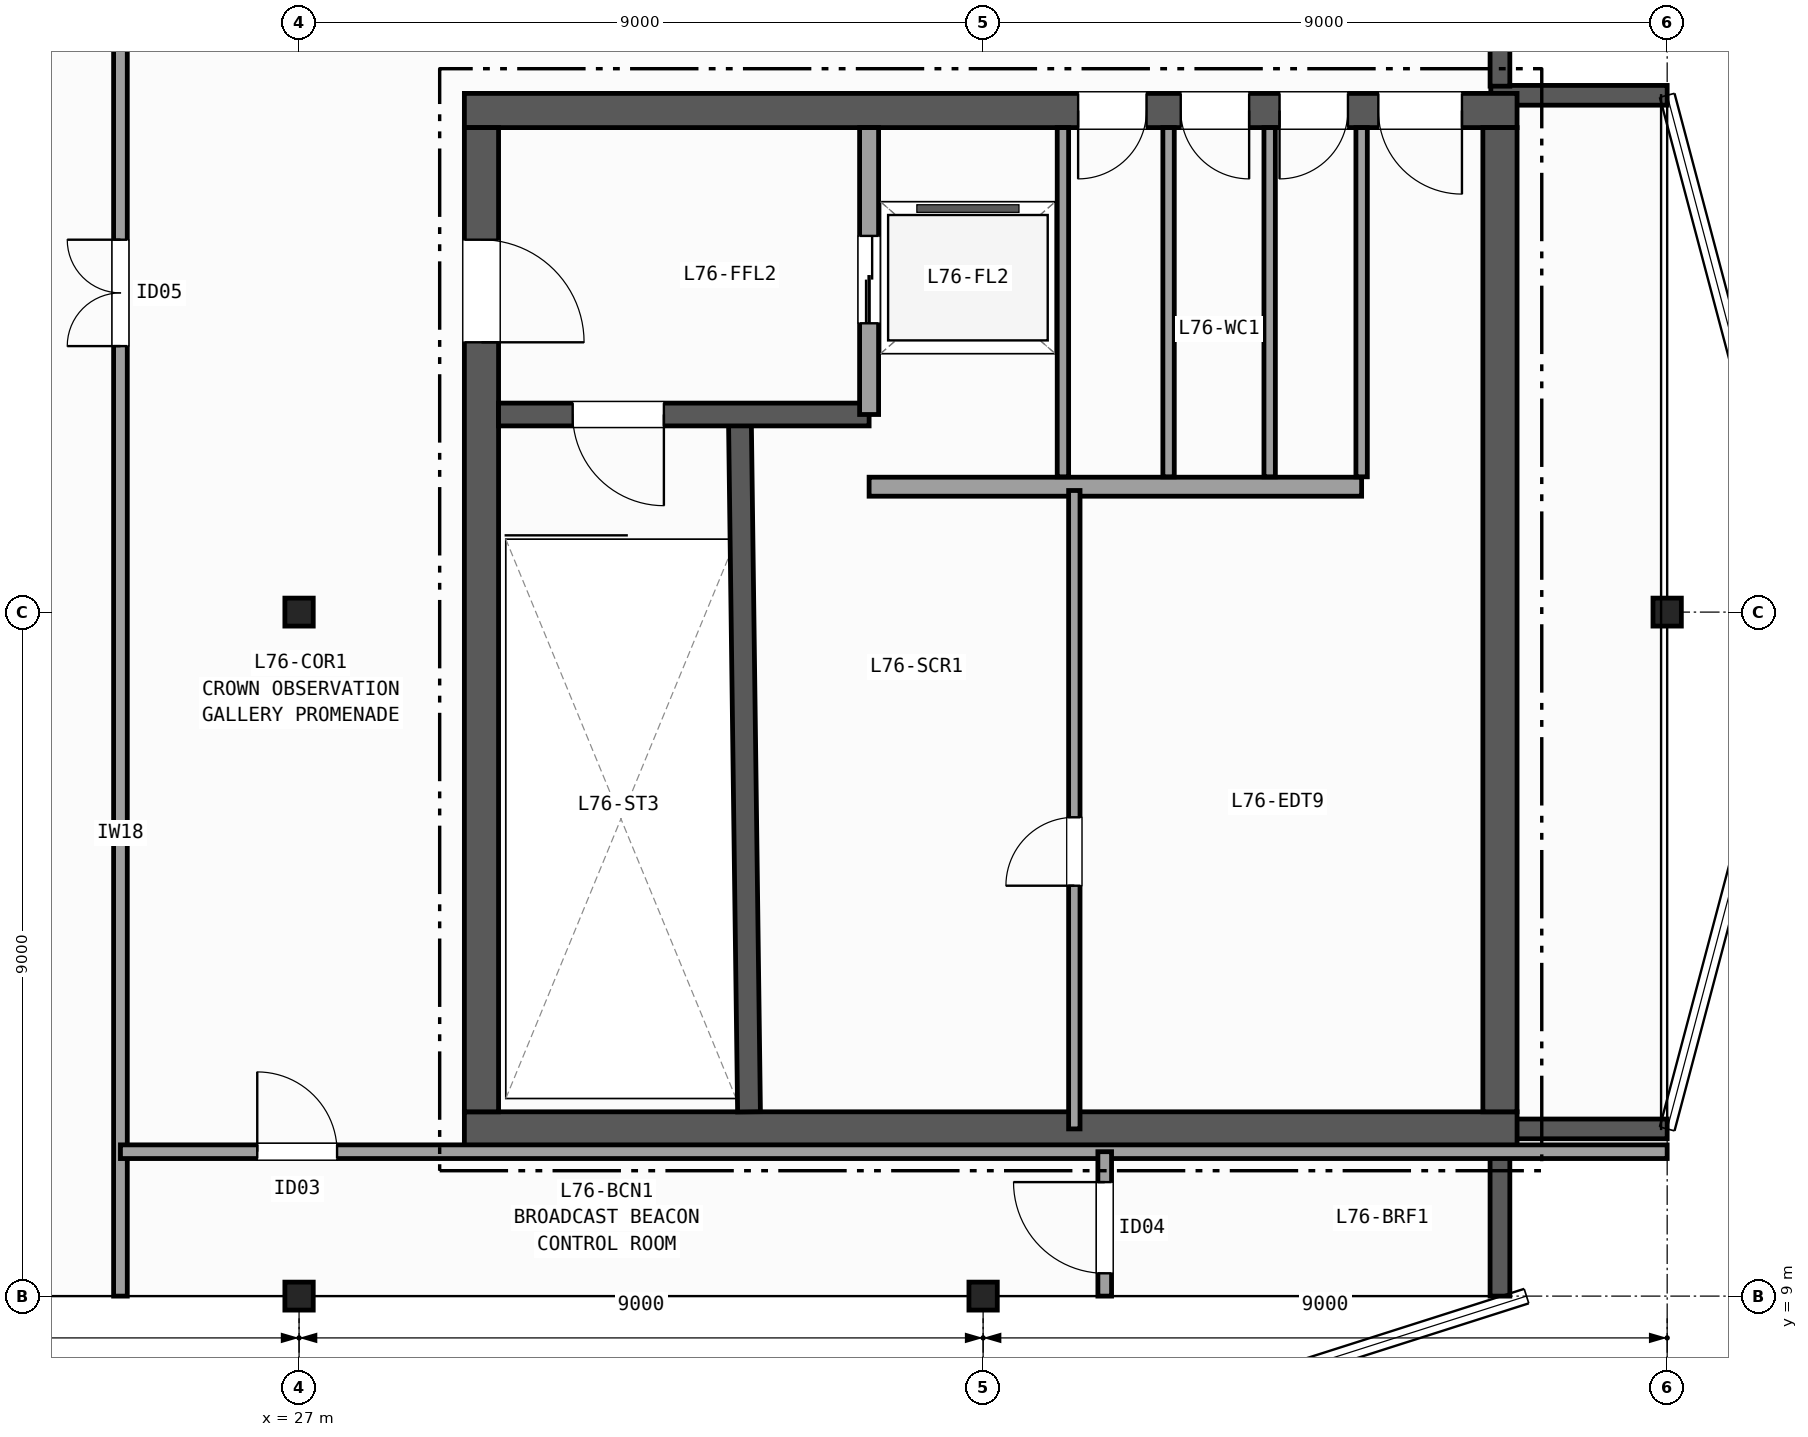
"""IFC4 building model, lengths in metres.
Left out: names, types, materials, properties, quantities, classifications, styles, units other than length and angle.
Written with IfcOpenShell. Run it as: python <this file> out.ifc"""

import sys

from ifc_helpers import new_model, si_unit, direction, frame, frame_2d, origin, origin_2d, place, context, subcontext, project, spatial, rectangle, i_section, extrude, element, fill, save


model = new_model("IFC4")
c1 = context("Model", 3, precision=1e-05, world=origin(), true_north=direction((0.0, 1.0)))
c2 = subcontext(c1, "Body", "Model", "MODEL_VIEW")
j1 = project(units=[si_unit("LENGTHUNIT", "METRE"), si_unit("PLANEANGLEUNIT", "RADIAN")], contexts=[c1])
p1 = place(None, origin())
s1 = spatial("IfcSite", under=j1, at=p1, CompositionType="ELEMENT")
p2 = place(p1, origin())
s2 = spatial("IfcBuilding", under=s1, at=p2, CompositionType="ELEMENT")
p3 = place(p2, frame((0.0, 0.0, 302.6)))
s3 = spatial("IfcBuildingStorey", under=s2, at=p3, CompositionType="ELEMENT", Elevation=302.6)
for number, where, z_axis, x_axis in (
    (1, (27.0, 9.0, 0.0), (0.0, 0.0, 1.0), (1.0, 0.0, 0.0)),
    (2, (27.0, 18.0, 0.0), (0.0, 0.0, 1.0), (1.0, 0.0, 0.0)),
    (3, (36.0, 9.0, 0.0), (0.0, 0.0, 1.0), (1.0, 0.0, 0.0)),
    (4, (45.0, 18.0, 0.0), (0.0, 0.0, 1.0), (1.0, 0.0, 0.0)),
):
    element("IfcColumn", number, at=place(p3, frame(where, z_axis=z_axis, x_axis=x_axis)), inside=s3, PredefinedType="COLUMN", context=c2, shape_type="SweptSolid", body=[
        extrude(i_section(OverallWidth=0.373, OverallDepth=0.368, WebThickness=0.015, FlangeThickness=0.024, FilletRadius=0.015, at=origin_2d()), origin(), (0.0, 0.0, 1.0), 5.2),
    ])
p4 = place(p3, frame((42.8, 9.0, 0.0), z_axis=(0.0, 0.0, 1.0), x_axis=(0.0, 1.0, 0.0)))
e5 = element("IfcWall", 5, at=p4, inside=s3, PredefinedType="SOLIDWALL", context=c2, shape_type="SweptSolid", body=[
    extrude(rectangle(XDim=2.08, YDim=0.26, at=frame_2d((1.04, 0.0))), origin(), (0.0, 0.0, 1.0), 4.9),
])
for number, where, z_axis, x_axis in (
    (6, (42.68, 11.2, 0.0), (0.0, 0.0, 1.0), (1.0, 0.0, 0.0)),
    (7, (45.0, 24.8, 0.0), (0.0, 0.0, 1.0), (-1.0, 0.0, 0.0)),
):
    element("IfcWall", number, at=place(p3, frame(where, z_axis=z_axis, x_axis=x_axis)), inside=s3, PredefinedType="SOLIDWALL", context=c2, shape_type="SweptSolid", body=[
        extrude(rectangle(XDim=2.32, YDim=0.26, at=frame_2d((1.16, 0.0))), origin(), (0.0, 0.0, 1.0), 4.9),
    ])
p5 = place(p3, frame((42.8, 24.92, 0.0), z_axis=(0.0, 0.0, 1.0), x_axis=(0.0, 1.0, 0.0)))
e8 = element("IfcWall", 8, at=p5, inside=s3, PredefinedType="SOLIDWALL", context=c2, shape_type="SweptSolid", body=[
    extrude(rectangle(XDim=2.08, YDim=0.26, at=frame_2d((1.04, 0.0))), origin(), (0.0, 0.0, 1.0), 4.9),
])
p6 = place(p3, frame((29.175, 11.2, 0.0), z_axis=(0.0, 0.0, 1.0), x_axis=(1.0, 0.0, 0.0)))
e9 = element("IfcWall", 9, at=p6, inside=s3, PredefinedType="SHEAR", context=c2, shape_type="SweptSolid", body=[
    extrude(rectangle(XDim=13.85, YDim=0.45, at=frame_2d((6.925, 0.0))), origin(), (0.0, 0.0, 1.0), 4.9),
])
p7 = place(p3, frame((43.025, 24.6, 0.0), z_axis=(0.0, 0.0, 1.0), x_axis=(-1.0, 0.0, 0.0)))
e10 = element("IfcWall", 10, at=p7, inside=s3, PredefinedType="SHEAR", context=c2, shape_type="SweptSolid", body=[
    extrude(rectangle(XDim=13.85, YDim=0.45, at=frame_2d((6.925, 0.0))), origin(), (0.0, 0.0, 1.0), 4.9),
])
p8 = place(p7, frame((0.725, 0.0, 0.0)))
e11 = element("IfcOpeningElement", 11, at=p8, cuts=e10, PredefinedType="OPENING", context=c2, shape_type="SweptSolid", body=[
    extrude(rectangle(XDim=1.1, YDim=2.15, at=frame_2d((0.55, 1.075))), frame((0.0, 0.235, 0.0), z_axis=(0.0, -1.0, 0.0), x_axis=(1.0, 0.0, 0.0)), (0.0, 0.0, 1.0), 0.47),
])
p9 = place(p7, frame((2.225, 0.0, 0.0)))
e12 = element("IfcOpeningElement", 12, at=p9, cuts=e10, PredefinedType="OPENING", context=c2, shape_type="SweptSolid", body=[
    extrude(rectangle(XDim=0.9, YDim=2.1, at=frame_2d((0.45, 1.05))), frame((0.0, 0.235, 0.0), z_axis=(0.0, -1.0, 0.0), x_axis=(1.0, 0.0, 0.0)), (0.0, 0.0, 1.0), 0.47),
])
p10 = place(p7, frame((3.525, 0.0, 0.0)))
e13 = element("IfcOpeningElement", 13, at=p10, cuts=e10, PredefinedType="OPENING", context=c2, shape_type="SweptSolid", body=[
    extrude(rectangle(XDim=0.9, YDim=2.1, at=frame_2d((0.45, 1.05))), frame((0.0, 0.235, 0.0), z_axis=(0.0, -1.0, 0.0), x_axis=(1.0, 0.0, 0.0)), (0.0, 0.0, 1.0), 0.47),
])
p11 = place(p7, frame((4.875, 0.0, 0.0)))
e14 = element("IfcOpeningElement", 14, at=p11, cuts=e10, PredefinedType="OPENING", context=c2, shape_type="SweptSolid", body=[
    extrude(rectangle(XDim=0.9, YDim=2.1, at=frame_2d((0.45, 1.05))), frame((0.0, 0.235, 0.0), z_axis=(0.0, -1.0, 0.0), x_axis=(1.0, 0.0, 0.0)), (0.0, 0.0, 1.0), 0.47),
])
p12 = place(p3, frame((29.4, 24.375, 0.0), z_axis=(0.0, 0.0, 1.0), x_axis=(0.0, -1.0, 0.0)))
e15 = element("IfcWall", 15, at=p12, inside=s3, PredefinedType="SHEAR", context=c2, shape_type="SweptSolid", body=[
    extrude(rectangle(XDim=12.95, YDim=0.45, at=frame_2d((6.475, 0.0))), origin(), (0.0, 0.0, 1.0), 4.9),
])
p13 = place(p12, frame((1.475, 0.0, 0.0)))
e16 = element("IfcOpeningElement", 16, at=p13, cuts=e15, PredefinedType="OPENING", context=c2, shape_type="SweptSolid", body=[
    extrude(rectangle(XDim=1.35, YDim=2.15, at=frame_2d((0.675, 1.075))), frame((0.0, 0.235, 0.0), z_axis=(0.0, -1.0, 0.0), x_axis=(1.0, 0.0, 0.0)), (0.0, 0.0, 1.0), 0.47),
])
p14 = place(p3, frame((42.8, 11.425, 0.0), z_axis=(0.0, 0.0, 1.0), x_axis=(0.0, 1.0, 0.0)))
e17 = element("IfcWall", 17, at=p14, inside=s3, PredefinedType="SHEAR", context=c2, shape_type="SweptSolid", body=[
    extrude(rectangle(XDim=12.95, YDim=0.45, at=frame_2d((6.475, 0.0))), origin(), (0.0, 0.0, 1.0), 4.9),
])
p15 = place(p3, frame((32.92, 11.425, 0.0), z_axis=(0.0, 0.0, 1.0), x_axis=(-0.013135638869, 0.999913723774, 0.0)))
e18 = element("IfcWall", 18, at=p15, inside=s3, PredefinedType="SHEAR", context=c2, shape_type="SweptSolid", body=[
    extrude(rectangle(XDim=9.126, YDim=0.3, at=frame_2d((4.563, 0.0))), origin(), (0.0, 0.0, 1.0), 4.9),
])
p16 = place(p3, frame((34.5, 20.6, 0.0), z_axis=(0.0, 0.0, 1.0), x_axis=(-1.0, 0.0, 0.0)))
e19 = element("IfcWall", 19, at=p16, inside=s3, PredefinedType="SHEAR", context=c2, shape_type="SweptSolid", body=[
    extrude(rectangle(XDim=4.875, YDim=0.3, at=frame_2d((2.438, 0.0))), origin(), (0.0, 0.0, 1.0), 4.9),
])
p17 = place(p16, frame((2.7, 0.0, 0.0)))
e20 = element("IfcOpeningElement", 20, at=p17, cuts=e19, PredefinedType="OPENING", context=c2, shape_type="SweptSolid", body=[
    extrude(rectangle(XDim=1.2, YDim=2.15, at=frame_2d((0.6, 1.075))), frame((0.0, 0.16, 0.0), z_axis=(0.0, -1.0, 0.0), x_axis=(1.0, 0.0, 0.0)), (0.0, 0.0, 1.0), 0.32),
])
p18 = place(p3, frame((34.5, 20.6, 0.0), z_axis=(0.0, 0.0, 1.0), x_axis=(0.0, 1.0, 0.0)))
e21 = element("IfcWall", 21, at=p18, inside=s3, PredefinedType="PARTITIONING", context=c2, shape_type="SweptSolid", body=[
    extrude(rectangle(XDim=3.775, YDim=0.25, at=frame_2d((1.887, 0.0))), origin(), (0.0, 0.0, 1.0), 4.9),
])
p19 = place(p18, frame((1.2, 0.0, 0.0)))
e22 = element("IfcOpeningElement", 22, at=p19, cuts=e21, PredefinedType="OPENING", context=c2, shape_type="SweptSolid", body=[
    extrude(rectangle(XDim=1.15, YDim=2.15, at=frame_2d((0.575, 1.075))), frame((0.0, 0.135, 0.0), z_axis=(0.0, -1.0, 0.0), x_axis=(1.0, 0.0, 0.0)), (0.0, 0.0, 1.0), 0.27),
])
p20 = place(p3, frame((34.5, 19.65, 0.0), z_axis=(0.0, 0.0, 1.0), x_axis=(1.0, 0.0, 0.0)))
e23 = element("IfcWall", 23, at=p20, inside=s3, PredefinedType="PARTITIONING", context=c2, shape_type="SweptSolid", body=[
    extrude(rectangle(XDim=6.48, YDim=0.25, at=frame_2d((3.24, 0.0))), origin(), (0.0, 0.0, 1.0), 4.9),
])
p21 = place(p3, frame((37.2, 11.2, 0.0), z_axis=(0.0, 0.0, 1.0), x_axis=(0.0, 1.0, 0.0)))
e24 = element("IfcWall", 24, at=p21, inside=s3, PredefinedType="PARTITIONING", context=c2, shape_type="SweptSolid", body=[
    extrude(rectangle(XDim=8.4, YDim=0.15, at=frame_2d((4.2, 0.0))), origin(), (0.0, 0.0, 1.0), 4.9),
])
p22 = place(p21, frame((3.2, 0.0, 0.0)))
e25 = element("IfcOpeningElement", 25, at=p22, cuts=e24, PredefinedType="OPENING", context=c2, shape_type="SweptSolid", body=[
    extrude(rectangle(XDim=0.9, YDim=2.1, at=frame_2d((0.45, 1.05))), frame((0.0, 0.085, 0.0), z_axis=(0.0, -1.0, 0.0), x_axis=(1.0, 0.0, 0.0)), (0.0, 0.0, 1.0), 0.17),
])
for number, where, z_axis, x_axis in (
    (26, (37.05, 19.78, 0.0), (0.0, 0.0, 1.0), (0.0, 1.0, 0.0)),
    (27, (38.44, 19.78, 0.0), (0.0, 0.0, 1.0), (0.0, 1.0, 0.0)),
    (28, (39.77, 19.78, 0.0), (0.0, 0.0, 1.0), (0.0, 1.0, 0.0)),
    (29, (40.98, 19.78, 0.0), (0.0, 0.0, 1.0), (0.0, 1.0, 0.0)),
):
    element("IfcWall", number, at=place(p3, frame(where, z_axis=z_axis, x_axis=x_axis)), inside=s3, PredefinedType="PARTITIONING", context=c2, shape_type="SweptSolid", body=[
        extrude(rectangle(XDim=4.595, YDim=0.15, at=frame_2d((2.297, 0.0))), origin(), (0.0, 0.0, 1.0), 4.9),
    ])
p23 = place(p3, frame((24.65, 9.0, 0.0), z_axis=(0.0, 0.0, 1.0), x_axis=(0.0, 1.0, 0.0)))
e30 = element("IfcWall", 30, at=p23, inside=s3, PredefinedType="PARTITIONING", context=c2, shape_type="SweptSolid", body=[
    extrude(rectangle(XDim=19.2, YDim=0.18, at=frame_2d((9.6, 0.0))), origin(), (0.0, 0.0, 1.0), 4.187),
])
p24 = place(p23, frame((12.5, 0.0, 0.0)))
e31 = element("IfcOpeningElement", 31, at=p24, cuts=e30, PredefinedType="OPENING", context=c2, shape_type="SweptSolid", body=[
    extrude(rectangle(XDim=1.4, YDim=2.15, at=frame_2d((0.7, 1.075))), frame((0.0, 0.1, 0.0), z_axis=(0.0, -1.0, 0.0), x_axis=(1.0, 0.0, 0.0)), (0.0, 0.0, 1.0), 0.2),
])
p25 = place(p3, frame((24.65, 10.9, 0.0), z_axis=(0.0, 0.0, 1.0), x_axis=(1.0, 0.0, 0.0)))
e32 = element("IfcWall", 32, at=p25, inside=s3, PredefinedType="PARTITIONING", context=c2, shape_type="SweptSolid", body=[
    extrude(rectangle(XDim=20.35, YDim=0.18, at=frame_2d((10.175, 0.0))), origin(), (0.0, 0.0, 1.0), 4.269),
])
p26 = place(p25, frame((1.8, 0.0, 0.0)))
e33 = element("IfcOpeningElement", 33, at=p26, cuts=e32, PredefinedType="OPENING", context=c2, shape_type="SweptSolid", body=[
    extrude(rectangle(XDim=1.05, YDim=2.15, at=frame_2d((0.525, 1.075))), frame((0.0, 0.1, 0.0), z_axis=(0.0, -1.0, 0.0), x_axis=(1.0, 0.0, 0.0)), (0.0, 0.0, 1.0), 0.2),
])
p27 = place(p3, frame((37.6, 9.0, 0.0), z_axis=(0.0, 0.0, 1.0), x_axis=(0.0, 1.0, 0.0)))
e34 = element("IfcWall", 34, at=p27, inside=s3, PredefinedType="PARTITIONING", context=c2, shape_type="SweptSolid", body=[
    extrude(rectangle(XDim=1.9, YDim=0.18, at=frame_2d((0.95, 0.0))), origin(), (0.0, 0.0, 1.0), 4.9),
])
p28 = place(p27, frame((0.3, 0.0, 0.0)))
e35 = element("IfcOpeningElement", 35, at=p28, cuts=e34, PredefinedType="OPENING", context=c2, shape_type="SweptSolid", body=[
    extrude(rectangle(XDim=1.2, YDim=2.15, at=frame_2d((0.6, 1.075))), frame((0.0, 0.1, 0.0), z_axis=(0.0, -1.0, 0.0), x_axis=(1.0, 0.0, 0.0)), (0.0, 0.0, 1.0), 0.2),
])
p29 = place(p17, origin())
e36 = element("IfcDoor", 36, at=p29, inside=s3, OperationType="SINGLE_SWING_LEFT", PredefinedType="DOOR", context=c2, shape_type="SweptSolid", body=[
    extrude(rectangle(XDim=1.2, YDim=2.15, at=frame_2d((0.6, 1.075))), frame((0.0, 0.025, 0.0), z_axis=(0.0, -1.0, 0.0), x_axis=(1.0, 0.0, 0.0)), (0.0, 0.0, 1.0), 0.05),
])
fill(e20, e36)
p30 = place(p13, origin())
e37 = element("IfcDoor", 37, at=p30, inside=s3, OperationType="SINGLE_SWING_RIGHT", PredefinedType="DOOR", context=c2, shape_type="SweptSolid", body=[
    extrude(rectangle(XDim=1.35, YDim=2.15, at=frame_2d((0.675, 1.075))), frame((0.0, 0.025, 0.0), z_axis=(0.0, -1.0, 0.0), x_axis=(1.0, 0.0, 0.0)), (0.0, 0.0, 1.0), 0.05),
])
fill(e16, e37)
p31 = place(p8, origin())
e38 = element("IfcDoor", 38, at=p31, inside=s3, OperationType="SINGLE_SWING_LEFT", PredefinedType="DOOR", context=c2, shape_type="SweptSolid", body=[
    extrude(rectangle(XDim=1.1, YDim=2.15, at=frame_2d((0.55, 1.075))), frame((0.0, 0.025, 0.0), z_axis=(0.0, -1.0, 0.0), x_axis=(1.0, 0.0, 0.0)), (0.0, 0.0, 1.0), 0.05),
])
fill(e11, e38)
p32 = place(p9, origin())
e39 = element("IfcDoor", 39, at=p32, inside=s3, OperationType="SINGLE_SWING_RIGHT", PredefinedType="DOOR", context=c2, shape_type="SweptSolid", body=[
    extrude(rectangle(XDim=0.9, YDim=2.1, at=frame_2d((0.45, 1.05))), frame((0.0, 0.025, 0.0), z_axis=(0.0, -1.0, 0.0), x_axis=(1.0, 0.0, 0.0)), (0.0, 0.0, 1.0), 0.05),
])
fill(e12, e39)
p33 = place(p10, origin())
e40 = element("IfcDoor", 40, at=p33, inside=s3, OperationType="SINGLE_SWING_LEFT", PredefinedType="DOOR", context=c2, shape_type="SweptSolid", body=[
    extrude(rectangle(XDim=0.9, YDim=2.1, at=frame_2d((0.45, 1.05))), frame((0.0, 0.025, 0.0), z_axis=(0.0, -1.0, 0.0), x_axis=(1.0, 0.0, 0.0)), (0.0, 0.0, 1.0), 0.05),
])
fill(e13, e40)
p34 = place(p11, origin())
e41 = element("IfcDoor", 41, at=p34, inside=s3, OperationType="SINGLE_SWING_RIGHT", PredefinedType="DOOR", context=c2, shape_type="SweptSolid", body=[
    extrude(rectangle(XDim=0.9, YDim=2.1, at=frame_2d((0.45, 1.05))), frame((0.0, 0.025, 0.0), z_axis=(0.0, -1.0, 0.0), x_axis=(1.0, 0.0, 0.0)), (0.0, 0.0, 1.0), 0.05),
])
fill(e14, e41)
p35 = place(p19, origin())
e42 = element("IfcDoor", 42, at=p35, inside=s3, OperationType="DOUBLE_DOOR_SLIDING", PredefinedType="DOOR", context=c2, shape_type="SweptSolid", body=[
    extrude(rectangle(XDim=1.15, YDim=2.15, at=frame_2d((0.575, 1.075))), frame((0.0, 0.025, 0.0), z_axis=(0.0, -1.0, 0.0), x_axis=(1.0, 0.0, 0.0)), (0.0, 0.0, 1.0), 0.05),
])
fill(e22, e42)
p36 = place(p22, origin())
e43 = element("IfcDoor", 43, at=p36, inside=s3, OperationType="SINGLE_SWING_LEFT", PredefinedType="DOOR", context=c2, shape_type="SweptSolid", body=[
    extrude(rectangle(XDim=0.9, YDim=2.1, at=frame_2d((0.45, 1.05))), frame((0.0, 0.025, 0.0), z_axis=(0.0, -1.0, 0.0), x_axis=(1.0, 0.0, 0.0)), (0.0, 0.0, 1.0), 0.05),
])
fill(e25, e43)
p37 = place(p24, origin())
e44 = element("IfcDoor", 44, at=p37, inside=s3, OperationType="DOUBLE_DOOR_SINGLE_SWING", PredefinedType="DOOR", context=c2, shape_type="SweptSolid", body=[
    extrude(rectangle(XDim=1.4, YDim=2.15, at=frame_2d((0.7, 1.075))), frame((0.0, 0.025, 0.0), z_axis=(0.0, -1.0, 0.0), x_axis=(1.0, 0.0, 0.0)), (0.0, 0.0, 1.0), 0.05),
])
fill(e31, e44)
p38 = place(p26, origin())
e45 = element("IfcDoor", 45, at=p38, inside=s3, OperationType="SINGLE_SWING_LEFT", PredefinedType="DOOR", context=c2, shape_type="SweptSolid", body=[
    extrude(rectangle(XDim=1.05, YDim=2.15, at=frame_2d((0.525, 1.075))), frame((0.0, 0.025, 0.0), z_axis=(0.0, -1.0, 0.0), x_axis=(1.0, 0.0, 0.0)), (0.0, 0.0, 1.0), 0.05),
])
fill(e33, e45)
p39 = place(p28, origin())
e46 = element("IfcDoor", 46, at=p39, inside=s3, OperationType="SINGLE_SWING_RIGHT", PredefinedType="DOOR", context=c2, shape_type="SweptSolid", body=[
    extrude(rectangle(XDim=1.2, YDim=2.15, at=frame_2d((0.6, 1.075))), frame((0.0, 0.025, 0.0), z_axis=(0.0, -1.0, 0.0), x_axis=(1.0, 0.0, 0.0)), (0.0, 0.0, 1.0), 0.05),
])
fill(e35, e46)
save(model, sys.argv[1])
